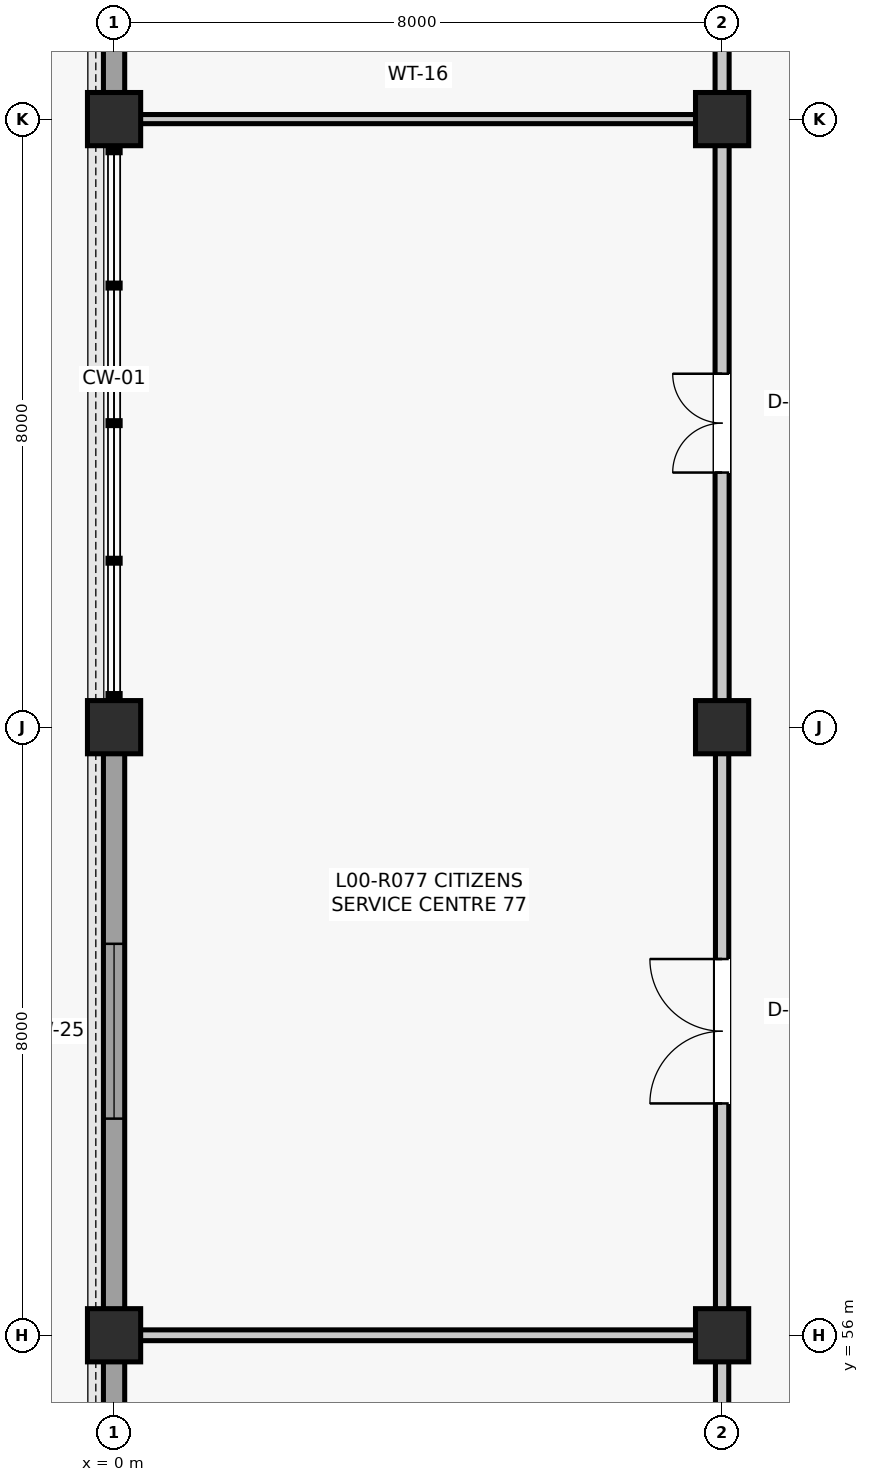
"""IFC4 building model, lengths in metres.
Left out: names, types, materials, properties, quantities, classifications, styles, units other than length and angle.
Written with IfcOpenShell. Run it as: python <this file> out.ifc"""

import sys

from ifc_helpers import new_model, si_unit, direction, frame, frame_2d, origin, origin_2d, place, context, subcontext, project, spatial, rectangle, extrude, element, fill, save


model = new_model("IFC4")
c1 = context("Model", 3, precision=1e-05, world=origin(), true_north=direction((0.0, 1.0)))
c2 = subcontext(c1, "Body", "Model", "MODEL_VIEW")
j1 = project(units=[si_unit("LENGTHUNIT", "METRE"), si_unit("PLANEANGLEUNIT", "RADIAN")], contexts=[c1])
p1 = place(None, origin())
s1 = spatial("IfcSite", under=j1, at=p1, CompositionType="ELEMENT")
p2 = place(p1, origin())
s2 = spatial("IfcBuilding", under=s1, at=p2, CompositionType="ELEMENT")
p3 = place(p2, origin())
s3 = spatial("IfcBuildingStorey", under=s2, at=p3, CompositionType="ELEMENT", Elevation=0.0)
for number, where, z_axis, x_axis in (
    (1, (0.0, 56.0, 0.0), (0.0, 0.0, 1.0), (1.0, 0.0, 0.0)),
    (2, (0.0, 64.0, 0.0), (0.0, 0.0, 1.0), (1.0, 0.0, 0.0)),
    (3, (0.0, 72.0, 0.0), (0.0, 0.0, 1.0), (1.0, 0.0, 0.0)),
    (4, (8.0, 56.0, 0.0), (0.0, 0.0, 1.0), (1.0, 0.0, 0.0)),
    (5, (8.0, 64.0, 0.0), (0.0, 0.0, 1.0), (1.0, 0.0, 0.0)),
    (6, (8.0, 72.0, 0.0), (0.0, 0.0, 1.0), (1.0, 0.0, 0.0)),
):
    element("IfcColumn", number, at=place(p3, frame(where, z_axis=z_axis, x_axis=x_axis)), inside=s3, PredefinedType="COLUMN", context=c2, shape_type="SweptSolid", body=[
        extrude(rectangle(XDim=0.7, YDim=0.7, at=origin_2d()), origin(), (0.0, 0.0, 1.0), 5.28),
    ])
p4 = place(p3, frame((0.0, 48.335, 0.0), z_axis=(0.0, 0.0, 1.0), x_axis=(0.0, 1.0, 0.0)))
e7 = element("IfcWall", 7, at=p4, inside=s3, PredefinedType="SOLIDWALL", context=c2, shape_type="SweptSolid", body=[
    extrude(rectangle(XDim=7.33, YDim=0.28, at=frame_2d((3.665, 0.0))), origin(), (0.0, 0.0, 1.0), 4.614),
])
p5 = place(p4, frame((2.565, 0.0, 0.0)))
e8 = element("IfcOpeningElement", 8, at=p5, cuts=e7, PredefinedType="OPENING", context=c2, shape_type="SweptSolid", body=[
    extrude(rectangle(XDim=2.2, YDim=2.5, at=frame_2d((1.1, 1.25))), frame((0.0, 0.15, 0.0), z_axis=(0.0, -1.0, 0.0), x_axis=(1.0, 0.0, 0.0)), (0.0, 0.0, 1.0), 0.3),
])
p6 = place(p3, frame((0.0, 56.335, 0.0), z_axis=(0.0, 0.0, 1.0), x_axis=(0.0, 1.0, 0.0)))
e9 = element("IfcWall", 9, at=p6, inside=s3, PredefinedType="SOLIDWALL", context=c2, shape_type="SweptSolid", body=[
    extrude(rectangle(XDim=7.33, YDim=0.28, at=frame_2d((3.665, 0.0))), origin(), (0.0, 0.0, 1.0), 4.677),
])
p7 = place(p6, frame((2.515, 0.0, 0.9)))
e10 = element("IfcOpeningElement", 10, at=p7, cuts=e9, PredefinedType="OPENING", context=c2, shape_type="SweptSolid", body=[
    extrude(rectangle(XDim=2.3, YDim=2.55, at=frame_2d((1.15, 1.275))), frame((0.0, 0.15, 0.0), z_axis=(0.0, -1.0, 0.0), x_axis=(1.0, 0.0, 0.0)), (0.0, 0.0, 1.0), 0.3),
])
p8 = place(p3, frame((0.0, 72.335, 0.0), z_axis=(0.0, 0.0, 1.0), x_axis=(0.0, 1.0, 0.0)))
e11 = element("IfcWall", 11, at=p8, inside=s3, PredefinedType="SOLIDWALL", context=c2, shape_type="SweptSolid", body=[
    extrude(rectangle(XDim=7.305, YDim=0.28, at=frame_2d((3.652, 0.0))), origin(), (0.0, 0.0, 1.0), 4.674),
])
p9 = place(p8, frame((2.577, 0.0, 0.9)))
e12 = element("IfcOpeningElement", 12, at=p9, cuts=e11, PredefinedType="OPENING", context=c2, shape_type="SweptSolid", body=[
    extrude(rectangle(XDim=2.15, YDim=2.8, at=frame_2d((1.075, 1.4))), frame((0.0, 0.15, 0.0), z_axis=(0.0, -1.0, 0.0), x_axis=(1.0, 0.0, 0.0)), (0.0, 0.0, 1.0), 0.3),
])
p10 = place(p3, frame((8.0, 48.34, 0.0), z_axis=(0.0, 0.0, 1.0), x_axis=(0.0, 1.0, 0.0)))
e13 = element("IfcWall", 13, at=p10, inside=s3, PredefinedType="PARTITIONING", context=c2, shape_type="SweptSolid", body=[
    extrude(rectangle(XDim=7.32, YDim=0.175, at=frame_2d((3.66, 0.0))), origin(), (0.0, 0.0, 1.0), 4.471),
])
p11 = place(p10, frame((3.135, 0.0, 0.0)))
e14 = element("IfcOpeningElement", 14, at=p11, cuts=e13, PredefinedType="OPENING", context=c2, shape_type="SweptSolid", body=[
    extrude(rectangle(XDim=1.05, YDim=2.15, at=frame_2d((0.525, 1.075))), frame((0.0, 0.097, 0.0), z_axis=(0.0, -1.0, 0.0), x_axis=(1.0, 0.0, 0.0)), (0.0, 0.0, 1.0), 0.195),
])
p12 = place(p3, frame((0.34, 56.0, 0.0), z_axis=(0.0, 0.0, 1.0), x_axis=(1.0, 0.0, 0.0)))
e15 = element("IfcWall", 15, at=p12, inside=s3, PredefinedType="PARTITIONING", context=c2, shape_type="SweptSolid", body=[
    extrude(rectangle(XDim=7.32, YDim=0.142, at=frame_2d((3.66, 0.0))), origin(), (0.0, 0.0, 1.0), 4.404),
])
p13 = place(p3, frame((8.0, 56.34, 0.0), z_axis=(0.0, 0.0, 1.0), x_axis=(0.0, 1.0, 0.0)))
e16 = element("IfcWall", 16, at=p13, inside=s3, PredefinedType="PARTITIONING", context=c2, shape_type="SweptSolid", body=[
    extrude(rectangle(XDim=7.32, YDim=0.175, at=frame_2d((3.66, 0.0))), origin(), (0.0, 0.0, 1.0), 4.403),
])
p14 = place(p13, frame((2.71, 0.0, 0.0)))
e17 = element("IfcOpeningElement", 17, at=p14, cuts=e16, PredefinedType="OPENING", context=c2, shape_type="SweptSolid", body=[
    extrude(rectangle(XDim=1.9, YDim=2.38, at=frame_2d((0.95, 1.19))), frame((0.0, 0.097, 0.0), z_axis=(0.0, -1.0, 0.0), x_axis=(1.0, 0.0, 0.0)), (0.0, 0.0, 1.0), 0.195),
])
p15 = place(p3, frame((8.0, 64.34, 0.0), z_axis=(0.0, 0.0, 1.0), x_axis=(0.0, 1.0, 0.0)))
e18 = element("IfcWall", 18, at=p15, inside=s3, PredefinedType="PARTITIONING", context=c2, shape_type="SweptSolid", body=[
    extrude(rectangle(XDim=7.32, YDim=0.185, at=frame_2d((3.66, 0.0))), origin(), (0.0, 0.0, 1.0), 4.412),
])
p16 = place(p15, frame((3.01, 0.0, 0.0)))
e19 = element("IfcOpeningElement", 19, at=p16, cuts=e18, PredefinedType="OPENING", context=c2, shape_type="SweptSolid", body=[
    extrude(rectangle(XDim=1.3, YDim=2.2, at=frame_2d((0.65, 1.1))), frame((0.0, 0.103, 0.0), z_axis=(0.0, -1.0, 0.0), x_axis=(1.0, 0.0, 0.0)), (0.0, 0.0, 1.0), 0.205),
])
p17 = place(p3, frame((0.34, 72.0, 0.0), z_axis=(0.0, 0.0, 1.0), x_axis=(1.0, 0.0, 0.0)))
e20 = element("IfcWall", 20, at=p17, inside=s3, PredefinedType="PARTITIONING", context=c2, shape_type="SweptSolid", body=[
    extrude(rectangle(XDim=7.32, YDim=0.12, at=frame_2d((3.66, 0.0))), origin(), (0.0, 0.0, 1.0), 4.403),
])
p18 = place(p3, frame((8.0, 72.34, 0.0), z_axis=(0.0, 0.0, 1.0), x_axis=(0.0, 1.0, 0.0)))
e21 = element("IfcWall", 21, at=p18, inside=s3, PredefinedType="PARTITIONING", context=c2, shape_type="SweptSolid", body=[
    extrude(rectangle(XDim=7.295, YDim=0.185, at=frame_2d((3.647, 0.0))), origin(), (0.0, 0.0, 1.0), 4.404),
])
p19 = place(p18, frame((3.127, 0.0, 0.0)))
e22 = element("IfcOpeningElement", 22, at=p19, cuts=e21, PredefinedType="OPENING", context=c2, shape_type="SweptSolid", body=[
    extrude(rectangle(XDim=1.04, YDim=2.18, at=frame_2d((0.52, 1.09))), frame((0.0, 0.103, 0.0), z_axis=(0.0, -1.0, 0.0), x_axis=(1.0, 0.0, 0.0)), (0.0, 0.0, 1.0), 0.205),
])
p20 = place(p7, origin())
e23 = element("IfcWindow", 23, at=p20, inside=s3, PartitioningType="SINGLE_PANEL", PredefinedType="WINDOW", context=c2, shape_type="SweptSolid", body=[
    extrude(rectangle(XDim=2.3, YDim=2.55, at=frame_2d((1.15, 1.275))), frame((0.0, 0.03, 0.0), z_axis=(0.0, -1.0, 0.0), x_axis=(1.0, 0.0, 0.0)), (0.0, 0.0, 1.0), 0.06),
])
fill(e10, e23)
p21 = place(p14, origin())
e24 = element("IfcDoor", 24, at=p21, inside=s3, OperationType="DOUBLE_DOOR_SINGLE_SWING", PredefinedType="DOOR", context=c2, shape_type="SweptSolid", body=[
    extrude(rectangle(XDim=1.9, YDim=2.38, at=frame_2d((0.95, 1.19))), frame((0.0, 0.025, 0.0), z_axis=(0.0, -1.0, 0.0), x_axis=(1.0, 0.0, 0.0)), (0.0, 0.0, 1.0), 0.05),
])
fill(e17, e24)
p22 = place(p16, origin())
e25 = element("IfcDoor", 25, at=p22, inside=s3, OperationType="DOUBLE_DOOR_SINGLE_SWING", PredefinedType="DOOR", context=c2, shape_type="SweptSolid", body=[
    extrude(rectangle(XDim=1.3, YDim=2.2, at=frame_2d((0.65, 1.1))), frame((0.0, 0.025, 0.0), z_axis=(0.0, -1.0, 0.0), x_axis=(1.0, 0.0, 0.0)), (0.0, 0.0, 1.0), 0.05),
])
fill(e19, e25)
save(model, sys.argv[1])
